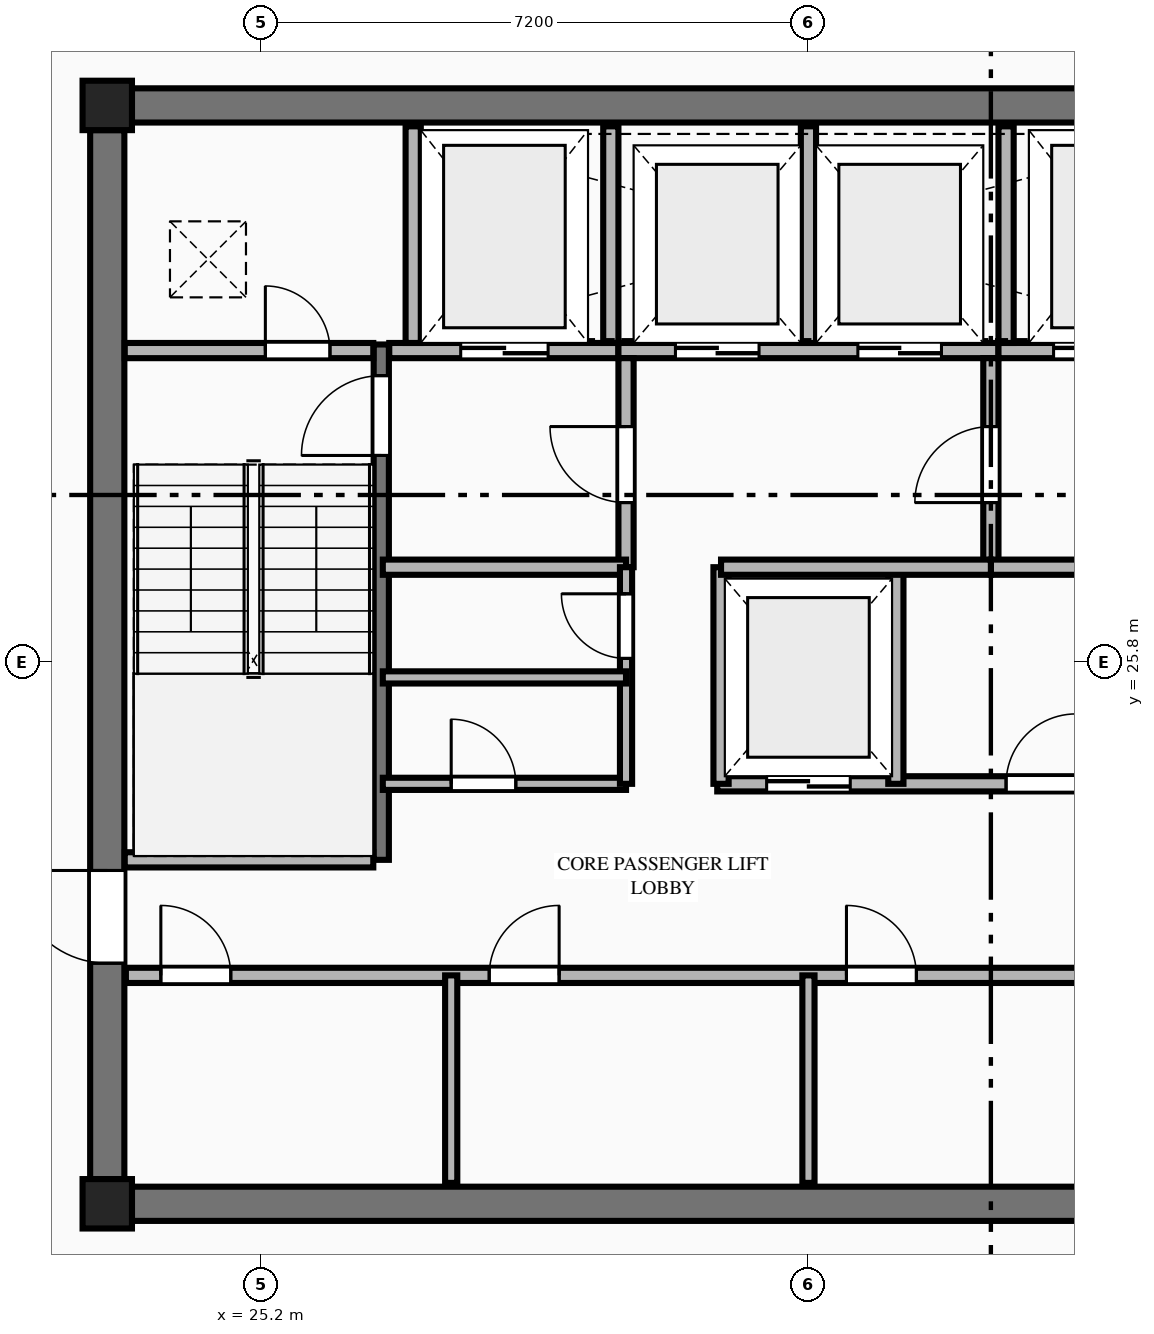
"""IFC4 building model, lengths in metres.
Left out: names, types, materials, properties, quantities, classifications, styles, units other than length and angle.
Written with IfcOpenShell. Run it as: python <this file> out.ifc"""

import sys

from ifc_helpers import new_model, si_unit, direction, frame, frame_2d, origin, origin_2d, place, context, subcontext, project, spatial, rectangle, extrude, element, fill, save


model = new_model("IFC4")
c1 = context("Model", 3, precision=1e-05, world=origin(), true_north=direction((0.0, 1.0)))
c2 = subcontext(c1, "Body", "Model", "MODEL_VIEW")
j1 = project(units=[si_unit("LENGTHUNIT", "METRE"), si_unit("PLANEANGLEUNIT", "RADIAN")], contexts=[c1])
p1 = place(None, origin())
s1 = spatial("IfcSite", under=j1, at=p1, CompositionType="ELEMENT")
p2 = place(p1, origin())
s2 = spatial("IfcBuilding", under=s1, at=p2, CompositionType="ELEMENT")
p3 = place(p2, frame((0.0, 0.0, 245.25)))
s3 = spatial("IfcBuildingStorey", under=s2, at=p3, CompositionType="ELEMENT", Elevation=245.25)
for number, where, z_axis, x_axis in (
    (1, (23.175, 18.675, 0.0), (0.0, 0.0, 1.0), (1.0, 0.0, 0.0)),
    (2, (23.175, 33.125, 0.0), (0.0, 0.0, 1.0), (1.0, 0.0, 0.0)),
):
    element("IfcColumn", number, at=place(p3, frame(where, z_axis=z_axis, x_axis=x_axis)), inside=s3, PredefinedType="COLUMN", context=c2, shape_type="SweptSolid", body=[
        extrude(rectangle(XDim=0.65, YDim=0.65, at=origin_2d()), origin(), (0.0, 0.0, 1.0), 3.65),
    ])
for number, where, z_axis, x_axis in (
    (3, (23.5, 18.675, 0.0), (0.0, 0.0, 1.0), (1.0, 0.0, 0.0)),
    (4, (23.5, 33.125, 0.0), (0.0, 0.0, 1.0), (1.0, 0.0, 0.0)),
):
    element("IfcWall", number, at=place(p3, frame(where, z_axis=z_axis, x_axis=x_axis)), inside=s3, PredefinedType="SHEAR", context=c2, shape_type="SweptSolid", body=[
        extrude(rectangle(XDim=17.8, YDim=0.45, at=frame_2d((8.9, 0.0))), origin(), (0.0, 0.0, 1.0), 3.45),
    ])
p4 = place(p3, frame((23.175, 19.0, 0.0), z_axis=(0.0, 0.0, 1.0), x_axis=(0.0, 1.0, 0.0)))
e5 = element("IfcWall", 5, at=p4, inside=s3, PredefinedType="SHEAR", context=c2, shape_type="SweptSolid", body=[
    extrude(rectangle(XDim=13.8, YDim=0.45, at=frame_2d((6.9, 0.0))), origin(), (0.0, 0.0, 1.0), 3.45),
])
p5 = place(p4, frame((2.84, 0.0, 0.0)))
e6 = element("IfcOpeningElement", 6, at=p5, cuts=e5, PredefinedType="OPENING", context=c2, shape_type="SweptSolid", body=[
    extrude(rectangle(XDim=1.22, YDim=2.25, at=frame_2d((0.61, 1.125))), frame((0.0, 0.235, 0.0), z_axis=(0.0, -1.0, 0.0), x_axis=(1.0, 0.0, 0.0)), (0.0, 0.0, 1.0), 0.47),
])
p6 = place(p3, frame((26.78, 23.2, 0.0), z_axis=(0.0, 0.0, 1.0), x_axis=(0.0, 1.0, 0.0)))
e7 = element("IfcWall", 7, at=p6, inside=s3, PredefinedType="SHEAR", context=c2, shape_type="SweptSolid", body=[
    extrude(rectangle(XDim=6.78, YDim=0.2, at=frame_2d((3.39, 0.0))), origin(), (0.0, 0.0, 1.0), 3.65),
])
p7 = place(p6, frame((5.32, 0.0, 0.0)))
e8 = element("IfcOpeningElement", 8, at=p7, cuts=e7, PredefinedType="OPENING", context=c2, shape_type="SweptSolid", body=[
    extrude(rectangle(XDim=1.05, YDim=2.15, at=frame_2d((0.525, 1.075))), frame((0.0, 0.11, 0.0), z_axis=(0.0, -1.0, 0.0), x_axis=(1.0, 0.0, 0.0)), (0.0, 0.0, 1.0), 0.22),
])
p8 = place(p3, frame((23.405, 23.2, 0.0), z_axis=(0.0, 0.0, 1.0), x_axis=(1.0, 0.0, 0.0)))
e9 = element("IfcWall", 9, at=p8, inside=s3, PredefinedType="PLUMBINGWALL", context=c2, shape_type="SweptSolid", body=[
    extrude(rectangle(XDim=3.27, YDim=0.2, at=frame_2d((1.635, 0.0))), origin(), (0.0, 0.0, 1.0), 3.45),
])
p9 = place(p3, frame((23.405, 29.9, 0.0), z_axis=(0.0, 0.0, 1.0), x_axis=(1.0, 0.0, 0.0)))
e10 = element("IfcWall", 10, at=p9, inside=s3, PredefinedType="PLUMBINGWALL", context=c2, shape_type="SweptSolid", body=[
    extrude(rectangle(XDim=3.27, YDim=0.2, at=frame_2d((1.635, 0.0))), origin(), (0.0, 0.0, 1.0), 3.45),
])
p10 = place(p9, frame((1.85, 0.0, 0.0)))
e11 = element("IfcOpeningElement", 11, at=p10, cuts=e10, PredefinedType="OPENING", context=c2, shape_type="SweptSolid", body=[
    extrude(rectangle(XDim=0.85, YDim=2.05, at=frame_2d((0.425, 1.025))), frame((0.0, 0.11, 0.0), z_axis=(0.0, -1.0, 0.0), x_axis=(1.0, 0.0, 0.0)), (0.0, 0.0, 1.0), 0.22),
])
p11 = place(p3, frame((26.885, 29.9, 0.0), z_axis=(0.0, 0.0, 1.0), x_axis=(1.0, 0.0, 0.0)))
e12 = element("IfcWall", 12, at=p11, inside=s3, PredefinedType="PLUMBINGWALL", context=c2, shape_type="SweptSolid", body=[
    extrude(rectangle(XDim=3.015, YDim=0.2, at=frame_2d((1.507, 0.0))), origin(), (0.0, 0.0, 1.0), 3.45),
])
p12 = place(p11, frame((0.94, 0.0, 0.0)))
e13 = element("IfcOpeningElement", 13, at=p12, cuts=e12, PredefinedType="OPENING", context=c2, shape_type="SweptSolid", body=[
    extrude(rectangle(XDim=1.15, YDim=2.2, at=frame_2d((0.575, 1.1))), frame((0.0, 0.11, 0.0), z_axis=(0.0, -1.0, 0.0), x_axis=(1.0, 0.0, 0.0)), (0.0, 0.0, 1.0), 0.22),
])
p13 = place(p3, frame((29.9, 29.9, 0.0), z_axis=(0.0, 0.0, 1.0), x_axis=(1.0, 0.0, 0.0)))
e14 = element("IfcWall", 14, at=p13, inside=s3, PredefinedType="PLUMBINGWALL", context=c2, shape_type="SweptSolid", body=[
    extrude(rectangle(XDim=5.0, YDim=0.2, at=frame_2d((2.5, 0.0))), origin(), (0.0, 0.0, 1.0), 3.45),
])
p14 = place(p13, frame((0.75, 0.0, 0.0)))
e15 = element("IfcOpeningElement", 15, at=p14, cuts=e14, PredefinedType="OPENING", context=c2, shape_type="SweptSolid", body=[
    extrude(rectangle(XDim=1.1, YDim=2.2, at=frame_2d((0.55, 1.1))), frame((0.0, 0.11, 0.0), z_axis=(0.0, -1.0, 0.0), x_axis=(1.0, 0.0, 0.0)), (0.0, 0.0, 1.0), 0.22),
])
p15 = place(p13, frame((3.15, 0.0, 0.0)))
e16 = element("IfcOpeningElement", 16, at=p15, cuts=e14, PredefinedType="OPENING", context=c2, shape_type="SweptSolid", body=[
    extrude(rectangle(XDim=1.1, YDim=2.2, at=frame_2d((0.55, 1.1))), frame((0.0, 0.11, 0.0), z_axis=(0.0, -1.0, 0.0), x_axis=(1.0, 0.0, 0.0)), (0.0, 0.0, 1.0), 0.22),
])
p16 = place(p3, frame((34.9, 29.9, 0.0), z_axis=(0.0, 0.0, 1.0), x_axis=(1.0, 0.0, 0.0)))
e17 = element("IfcWall", 17, at=p16, inside=s3, PredefinedType="PLUMBINGWALL", context=c2, shape_type="SweptSolid", body=[
    extrude(rectangle(XDim=3.015, YDim=0.2, at=frame_2d((1.508, 0.0))), origin(), (0.0, 0.0, 1.0), 3.45),
])
p17 = place(p16, frame((0.725, 0.0, 0.0)))
e18 = element("IfcOpeningElement", 18, at=p17, cuts=e17, PredefinedType="OPENING", context=c2, shape_type="SweptSolid", body=[
    extrude(rectangle(XDim=1.15, YDim=2.2, at=frame_2d((0.575, 1.1))), frame((0.0, 0.11, 0.0), z_axis=(0.0, -1.0, 0.0), x_axis=(1.0, 0.0, 0.0)), (0.0, 0.0, 1.0), 0.22),
])
for number, where, z_axis, x_axis in (
    (19, (27.2, 30.0, 0.0), (0.0, 0.0, 1.0), (0.0, 1.0, 0.0)),
    (20, (29.8, 30.0, 0.0), (0.0, 0.0, 1.0), (0.0, 1.0, 0.0)),
    (21, (32.4, 30.0, 0.0), (0.0, 0.0, 1.0), (0.0, 1.0, 0.0)),
    (22, (35.0, 30.0, 0.0), (0.0, 0.0, 1.0), (0.0, 1.0, 0.0)),
):
    element("IfcWall", number, at=place(p3, frame(where, z_axis=z_axis, x_axis=x_axis)), inside=s3, PredefinedType="PLUMBINGWALL", context=c2, shape_type="SweptSolid", body=[
        extrude(rectangle(XDim=2.85, YDim=0.2, at=frame_2d((1.425, 0.0))), origin(), (0.0, 0.0, 1.0), 3.45),
    ])
p18 = place(p3, frame((30.0, 27.05, 0.0), z_axis=(0.0, 0.0, 1.0), x_axis=(0.0, 1.0, 0.0)))
e23 = element("IfcWall", 23, at=p18, inside=s3, PredefinedType="PLUMBINGWALL", context=c2, shape_type="SweptSolid", body=[
    extrude(rectangle(XDim=2.75, YDim=0.2, at=frame_2d((1.375, 0.0))), origin(), (0.0, 0.0, 1.0), 3.45),
])
p19 = place(p18, frame((0.85, 0.0, 0.0)))
e24 = element("IfcOpeningElement", 24, at=p19, cuts=e23, PredefinedType="OPENING", context=c2, shape_type="SweptSolid", body=[
    extrude(rectangle(XDim=1.0, YDim=2.15, at=frame_2d((0.5, 1.075))), frame((0.0, 0.11, 0.0), z_axis=(0.0, -1.0, 0.0), x_axis=(1.0, 0.0, 0.0)), (0.0, 0.0, 1.0), 0.22),
])
p20 = place(p3, frame((26.8, 27.05, 0.0), z_axis=(0.0, 0.0, 1.0), x_axis=(1.0, 0.0, 0.0)))
e25 = element("IfcWall", 25, at=p20, inside=s3, PredefinedType="PLUMBINGWALL", context=c2, shape_type="SweptSolid", body=[
    extrude(rectangle(XDim=3.2, YDim=0.2, at=frame_2d((1.6, 0.0))), origin(), (0.0, 0.0, 1.0), 3.45),
])
p21 = place(p3, frame((34.8, 27.05, 0.0), z_axis=(0.0, 0.0, 1.0), x_axis=(0.0, 1.0, 0.0)))
e26 = element("IfcWall", 26, at=p21, inside=s3, PredefinedType="PLUMBINGWALL", context=c2, shape_type="SweptSolid", body=[
    extrude(rectangle(XDim=2.75, YDim=0.2, at=frame_2d((1.375, 0.0))), origin(), (0.0, 0.0, 1.0), 3.45),
])
p22 = place(p21, frame((0.85, 0.0, 0.0)))
e27 = element("IfcOpeningElement", 27, at=p22, cuts=e26, PredefinedType="OPENING", context=c2, shape_type="SweptSolid", body=[
    extrude(rectangle(XDim=1.0, YDim=2.15, at=frame_2d((0.5, 1.075))), frame((0.0, 0.11, 0.0), z_axis=(0.0, -1.0, 0.0), x_axis=(1.0, 0.0, 0.0)), (0.0, 0.0, 1.0), 0.22),
])
p23 = place(p3, frame((34.8, 27.05, 0.0), z_axis=(0.0, 0.0, 1.0), x_axis=(1.0, 0.0, 0.0)))
e28 = element("IfcWall", 28, at=p23, inside=s3, PredefinedType="PLUMBINGWALL", context=c2, shape_type="SweptSolid", body=[
    extrude(rectangle(XDim=3.2, YDim=0.2, at=frame_2d((1.6, 0.0))), origin(), (0.0, 0.0, 1.0), 3.45),
])
p24 = place(p3, frame((26.8, 24.2, 0.0), z_axis=(0.0, 0.0, 1.0), x_axis=(1.0, 0.0, 0.0)))
e29 = element("IfcWall", 29, at=p24, inside=s3, PredefinedType="PARTITIONING", context=c2, shape_type="SweptSolid", body=[
    extrude(rectangle(XDim=3.2, YDim=0.16, at=frame_2d((1.6, 0.0))), origin(), (0.0, 0.0, 1.0), 3.45),
])
p25 = place(p24, frame((0.9, 0.0, 0.0)))
e30 = element("IfcOpeningElement", 30, at=p25, cuts=e29, PredefinedType="OPENING", context=c2, shape_type="SweptSolid", body=[
    extrude(rectangle(XDim=0.85, YDim=2.05, at=frame_2d((0.425, 1.025))), frame((0.0, 0.09, 0.0), z_axis=(0.0, -1.0, 0.0), x_axis=(1.0, 0.0, 0.0)), (0.0, 0.0, 1.0), 0.18),
])
p26 = place(p3, frame((30.0, 24.2, 0.0), z_axis=(0.0, 0.0, 1.0), x_axis=(0.0, 1.0, 0.0)))
e31 = element("IfcWall", 31, at=p26, inside=s3, PredefinedType="PARTITIONING", context=c2, shape_type="SweptSolid", body=[
    extrude(rectangle(XDim=2.85, YDim=0.16, at=frame_2d((1.425, 0.0))), origin(), (0.0, 0.0, 1.0), 3.45),
])
p27 = place(p26, frame((1.65, 0.0, 0.0)))
e32 = element("IfcOpeningElement", 32, at=p27, cuts=e31, PredefinedType="OPENING", context=c2, shape_type="SweptSolid", body=[
    extrude(rectangle(XDim=0.85, YDim=2.05, at=frame_2d((0.425, 1.025))), frame((0.0, 0.09, 0.0), z_axis=(0.0, -1.0, 0.0), x_axis=(1.0, 0.0, 0.0)), (0.0, 0.0, 1.0), 0.18),
])
p28 = place(p3, frame((31.2, 24.2, 0.0), z_axis=(0.0, 0.0, 1.0), x_axis=(1.0, 0.0, 0.0)))
e33 = element("IfcWall", 33, at=p28, inside=s3, PredefinedType="PLUMBINGWALL", context=c2, shape_type="SweptSolid", body=[
    extrude(rectangle(XDim=6.8, YDim=0.2, at=frame_2d((3.4, 0.0))), origin(), (0.0, 0.0, 1.0), 3.45),
])
p29 = place(p28, frame((0.65, 0.0, 0.0)))
e34 = element("IfcOpeningElement", 34, at=p29, cuts=e33, PredefinedType="OPENING", context=c2, shape_type="SweptSolid", body=[
    extrude(rectangle(XDim=1.1, YDim=2.2, at=frame_2d((0.55, 1.1))), frame((0.0, 0.11, 0.0), z_axis=(0.0, -1.0, 0.0), x_axis=(1.0, 0.0, 0.0)), (0.0, 0.0, 1.0), 0.22),
])
p30 = place(p28, frame((3.8, 0.0, 0.0)))
e35 = element("IfcOpeningElement", 35, at=p30, cuts=e33, PredefinedType="OPENING", context=c2, shape_type="SweptSolid", body=[
    extrude(rectangle(XDim=0.92, YDim=2.15, at=frame_2d((0.46, 1.075))), frame((0.0, 0.11, 0.0), z_axis=(0.0, -1.0, 0.0), x_axis=(1.0, 0.0, 0.0)), (0.0, 0.0, 1.0), 0.22),
])
for number, where, z_axis, x_axis in (
    (36, (31.25, 24.2, 0.0), (0.0, 0.0, 1.0), (0.0, 1.0, 0.0)),
    (37, (33.55, 24.2, 0.0), (0.0, 0.0, 1.0), (0.0, 1.0, 0.0)),
):
    element("IfcWall", number, at=place(p3, frame(where, z_axis=z_axis, x_axis=x_axis)), inside=s3, PredefinedType="PLUMBINGWALL", context=c2, shape_type="SweptSolid", body=[
        extrude(rectangle(XDim=2.85, YDim=0.2, at=frame_2d((1.425, 0.0))), origin(), (0.0, 0.0, 1.0), 3.45),
    ])
p31 = place(p3, frame((31.25, 27.05, 0.0), z_axis=(0.0, 0.0, 1.0), x_axis=(1.0, 0.0, 0.0)))
e38 = element("IfcWall", 38, at=p31, inside=s3, PredefinedType="PLUMBINGWALL", context=c2, shape_type="SweptSolid", body=[
    extrude(rectangle(XDim=3.55, YDim=0.2, at=frame_2d((1.775, 0.0))), origin(), (0.0, 0.0, 1.0), 3.45),
])
p32 = place(p3, frame((26.8, 25.6, 0.0), z_axis=(0.0, 0.0, 1.0), x_axis=(1.0, 0.0, 0.0)))
e39 = element("IfcWall", 39, at=p32, inside=s3, PredefinedType="PARTITIONING", context=c2, shape_type="SweptSolid", body=[
    extrude(rectangle(XDim=3.2, YDim=0.16, at=frame_2d((1.6, 0.0))), origin(), (0.0, 0.0, 1.0), 3.45),
])
p33 = place(p3, frame((23.42, 21.68, 0.0), z_axis=(0.0, 0.0, 1.0), x_axis=(1.0, 0.0, 0.0)))
e40 = element("IfcWall", 40, at=p33, inside=s3, PredefinedType="PLUMBINGWALL", context=c2, shape_type="SweptSolid", body=[
    extrude(rectangle(XDim=17.96, YDim=0.2, at=frame_2d((8.98, 0.0))), origin(), (0.0, 0.0, 1.0), 3.45),
])
p34 = place(p33, frame((0.46, 0.0, 0.0)))
e41 = element("IfcOpeningElement", 41, at=p34, cuts=e40, PredefinedType="OPENING", context=c2, shape_type="SweptSolid", body=[
    extrude(rectangle(XDim=0.92, YDim=2.15, at=frame_2d((0.46, 1.075))), frame((0.0, 0.11, 0.0), z_axis=(0.0, -1.0, 0.0), x_axis=(1.0, 0.0, 0.0)), (0.0, 0.0, 1.0), 0.22),
])
p35 = place(p33, frame((4.78, 0.0, 0.0)))
e42 = element("IfcOpeningElement", 42, at=p35, cuts=e40, PredefinedType="OPENING", context=c2, shape_type="SweptSolid", body=[
    extrude(rectangle(XDim=0.92, YDim=2.15, at=frame_2d((0.46, 1.075))), frame((0.0, 0.11, 0.0), z_axis=(0.0, -1.0, 0.0), x_axis=(1.0, 0.0, 0.0)), (0.0, 0.0, 1.0), 0.22),
])
p36 = place(p33, frame((9.48, 0.0, 0.0)))
e43 = element("IfcOpeningElement", 43, at=p36, cuts=e40, PredefinedType="OPENING", context=c2, shape_type="SweptSolid", body=[
    extrude(rectangle(XDim=0.92, YDim=2.15, at=frame_2d((0.46, 1.075))), frame((0.0, 0.11, 0.0), z_axis=(0.0, -1.0, 0.0), x_axis=(1.0, 0.0, 0.0)), (0.0, 0.0, 1.0), 0.22),
])
p37 = place(p33, frame((14.08, 0.0, 0.0)))
e44 = element("IfcOpeningElement", 44, at=p37, cuts=e40, PredefinedType="OPENING", context=c2, shape_type="SweptSolid", body=[
    extrude(rectangle(XDim=0.92, YDim=2.15, at=frame_2d((0.46, 1.075))), frame((0.0, 0.11, 0.0), z_axis=(0.0, -1.0, 0.0), x_axis=(1.0, 0.0, 0.0)), (0.0, 0.0, 1.0), 0.22),
])
for number, where, z_axis, x_axis in (
    (45, (27.7, 18.95, 0.0), (0.0, 0.0, 1.0), (0.0, 1.0, 0.0)),
    (46, (32.4, 18.95, 0.0), (0.0, 0.0, 1.0), (0.0, 1.0, 0.0)),
):
    element("IfcWall", number, at=place(p3, frame(where, z_axis=z_axis, x_axis=x_axis)), inside=s3, PredefinedType="PARTITIONING", context=c2, shape_type="SweptSolid", body=[
        extrude(rectangle(XDim=2.73, YDim=0.16, at=frame_2d((1.365, 0.0))), origin(), (0.0, 0.0, 1.0), 3.45),
    ])
p38 = place(p5, origin())
e47 = element("IfcDoor", 47, at=p38, inside=s3, OperationType="SINGLE_SWING_RIGHT", PredefinedType="DOOR", context=c2, shape_type="SweptSolid", body=[
    extrude(rectangle(XDim=1.22, YDim=2.25, at=frame_2d((0.61, 1.125))), frame((0.0, 0.025, 0.0), z_axis=(0.0, -1.0, 0.0), x_axis=(1.0, 0.0, 0.0)), (0.0, 0.0, 1.0), 0.05),
])
fill(e6, e47)
p39 = place(p7, origin())
e48 = element("IfcDoor", 48, at=p39, inside=s3, OperationType="SINGLE_SWING_LEFT", PredefinedType="DOOR", context=c2, shape_type="SweptSolid", body=[
    extrude(rectangle(XDim=1.05, YDim=2.15, at=frame_2d((0.525, 1.075))), frame((0.0, 0.025, 0.0), z_axis=(0.0, -1.0, 0.0), x_axis=(1.0, 0.0, 0.0)), (0.0, 0.0, 1.0), 0.05),
])
fill(e8, e48)
p40 = place(p10, origin())
e49 = element("IfcDoor", 49, at=p40, inside=s3, OperationType="SINGLE_SWING_LEFT", PredefinedType="DOOR", context=c2, shape_type="SweptSolid", body=[
    extrude(rectangle(XDim=0.85, YDim=2.05, at=frame_2d((0.425, 1.025))), frame((0.0, 0.025, 0.0), z_axis=(0.0, -1.0, 0.0), x_axis=(1.0, 0.0, 0.0)), (0.0, 0.0, 1.0), 0.05),
])
fill(e11, e49)
p41 = place(p12, origin())
e50 = element("IfcDoor", 50, at=p41, inside=s3, OperationType="DOUBLE_DOOR_SLIDING", PredefinedType="DOOR", context=c2, shape_type="SweptSolid", body=[
    extrude(rectangle(XDim=1.15, YDim=2.2, at=frame_2d((0.575, 1.1))), frame((0.0, 0.025, 0.0), z_axis=(0.0, -1.0, 0.0), x_axis=(1.0, 0.0, 0.0)), (0.0, 0.0, 1.0), 0.05),
])
fill(e13, e50)
p42 = place(p17, origin())
e51 = element("IfcDoor", 51, at=p42, inside=s3, OperationType="DOUBLE_DOOR_SLIDING", PredefinedType="DOOR", context=c2, shape_type="SweptSolid", body=[
    extrude(rectangle(XDim=1.15, YDim=2.2, at=frame_2d((0.575, 1.1))), frame((0.0, 0.025, 0.0), z_axis=(0.0, -1.0, 0.0), x_axis=(1.0, 0.0, 0.0)), (0.0, 0.0, 1.0), 0.05),
])
fill(e18, e51)
p43 = place(p14, origin())
e52 = element("IfcDoor", 52, at=p43, inside=s3, OperationType="DOUBLE_DOOR_SLIDING", PredefinedType="DOOR", context=c2, shape_type="SweptSolid", body=[
    extrude(rectangle(XDim=1.1, YDim=2.2, at=frame_2d((0.55, 1.1))), frame((0.0, 0.025, 0.0), z_axis=(0.0, -1.0, 0.0), x_axis=(1.0, 0.0, 0.0)), (0.0, 0.0, 1.0), 0.05),
])
fill(e15, e52)
p44 = place(p15, origin())
e53 = element("IfcDoor", 53, at=p44, inside=s3, OperationType="DOUBLE_DOOR_SLIDING", PredefinedType="DOOR", context=c2, shape_type="SweptSolid", body=[
    extrude(rectangle(XDim=1.1, YDim=2.2, at=frame_2d((0.55, 1.1))), frame((0.0, 0.025, 0.0), z_axis=(0.0, -1.0, 0.0), x_axis=(1.0, 0.0, 0.0)), (0.0, 0.0, 1.0), 0.05),
])
fill(e16, e53)
p45 = place(p19, origin())
e54 = element("IfcDoor", 54, at=p45, inside=s3, OperationType="SINGLE_SWING_RIGHT", PredefinedType="DOOR", context=c2, shape_type="SweptSolid", body=[
    extrude(rectangle(XDim=1.0, YDim=2.15, at=frame_2d((0.5, 1.075))), frame((0.0, 0.025, 0.0), z_axis=(0.0, -1.0, 0.0), x_axis=(1.0, 0.0, 0.0)), (0.0, 0.0, 1.0), 0.05),
])
fill(e24, e54)
p46 = place(p22, origin())
e55 = element("IfcDoor", 55, at=p46, inside=s3, OperationType="SINGLE_SWING_LEFT", PredefinedType="DOOR", context=c2, shape_type="SweptSolid", body=[
    extrude(rectangle(XDim=1.0, YDim=2.15, at=frame_2d((0.5, 1.075))), frame((0.0, 0.025, 0.0), z_axis=(0.0, -1.0, 0.0), x_axis=(1.0, 0.0, 0.0)), (0.0, 0.0, 1.0), 0.05),
])
fill(e27, e55)
p47 = place(p29, origin())
e56 = element("IfcDoor", 56, at=p47, inside=s3, OperationType="DOUBLE_DOOR_SLIDING", PredefinedType="DOOR", context=c2, shape_type="SweptSolid", body=[
    extrude(rectangle(XDim=1.1, YDim=2.2, at=frame_2d((0.55, 1.1))), frame((0.0, 0.025, 0.0), z_axis=(0.0, -1.0, 0.0), x_axis=(1.0, 0.0, 0.0)), (0.0, 0.0, 1.0), 0.05),
])
fill(e34, e56)
p48 = place(p25, origin())
e57 = element("IfcDoor", 57, at=p48, inside=s3, OperationType="SINGLE_SWING_LEFT", PredefinedType="DOOR", context=c2, shape_type="SweptSolid", body=[
    extrude(rectangle(XDim=0.85, YDim=2.05, at=frame_2d((0.425, 1.025))), frame((0.0, 0.025, 0.0), z_axis=(0.0, -1.0, 0.0), x_axis=(1.0, 0.0, 0.0)), (0.0, 0.0, 1.0), 0.05),
])
fill(e30, e57)
p49 = place(p27, origin())
e58 = element("IfcDoor", 58, at=p49, inside=s3, OperationType="SINGLE_SWING_RIGHT", PredefinedType="DOOR", context=c2, shape_type="SweptSolid", body=[
    extrude(rectangle(XDim=0.85, YDim=2.05, at=frame_2d((0.425, 1.025))), frame((0.0, 0.025, 0.0), z_axis=(0.0, -1.0, 0.0), x_axis=(1.0, 0.0, 0.0)), (0.0, 0.0, 1.0), 0.05),
])
fill(e32, e58)
p50 = place(p30, origin())
e59 = element("IfcDoor", 59, at=p50, inside=s3, OperationType="SINGLE_SWING_RIGHT", PredefinedType="DOOR", context=c2, shape_type="SweptSolid", body=[
    extrude(rectangle(XDim=0.92, YDim=2.15, at=frame_2d((0.46, 1.075))), frame((0.0, 0.025, 0.0), z_axis=(0.0, -1.0, 0.0), x_axis=(1.0, 0.0, 0.0)), (0.0, 0.0, 1.0), 0.05),
])
fill(e35, e59)
p51 = place(p34, origin())
e60 = element("IfcDoor", 60, at=p51, inside=s3, OperationType="SINGLE_SWING_LEFT", PredefinedType="DOOR", context=c2, shape_type="SweptSolid", body=[
    extrude(rectangle(XDim=0.92, YDim=2.15, at=frame_2d((0.46, 1.075))), frame((0.0, 0.025, 0.0), z_axis=(0.0, -1.0, 0.0), x_axis=(1.0, 0.0, 0.0)), (0.0, 0.0, 1.0), 0.05),
])
fill(e41, e60)
p52 = place(p35, origin())
e61 = element("IfcDoor", 61, at=p52, inside=s3, OperationType="SINGLE_SWING_RIGHT", PredefinedType="DOOR", context=c2, shape_type="SweptSolid", body=[
    extrude(rectangle(XDim=0.92, YDim=2.15, at=frame_2d((0.46, 1.075))), frame((0.0, 0.025, 0.0), z_axis=(0.0, -1.0, 0.0), x_axis=(1.0, 0.0, 0.0)), (0.0, 0.0, 1.0), 0.05),
])
fill(e42, e61)
p53 = place(p36, origin())
e62 = element("IfcDoor", 62, at=p53, inside=s3, OperationType="SINGLE_SWING_LEFT", PredefinedType="DOOR", context=c2, shape_type="SweptSolid", body=[
    extrude(rectangle(XDim=0.92, YDim=2.15, at=frame_2d((0.46, 1.075))), frame((0.0, 0.025, 0.0), z_axis=(0.0, -1.0, 0.0), x_axis=(1.0, 0.0, 0.0)), (0.0, 0.0, 1.0), 0.05),
])
fill(e43, e62)
save(model, sys.argv[1])
